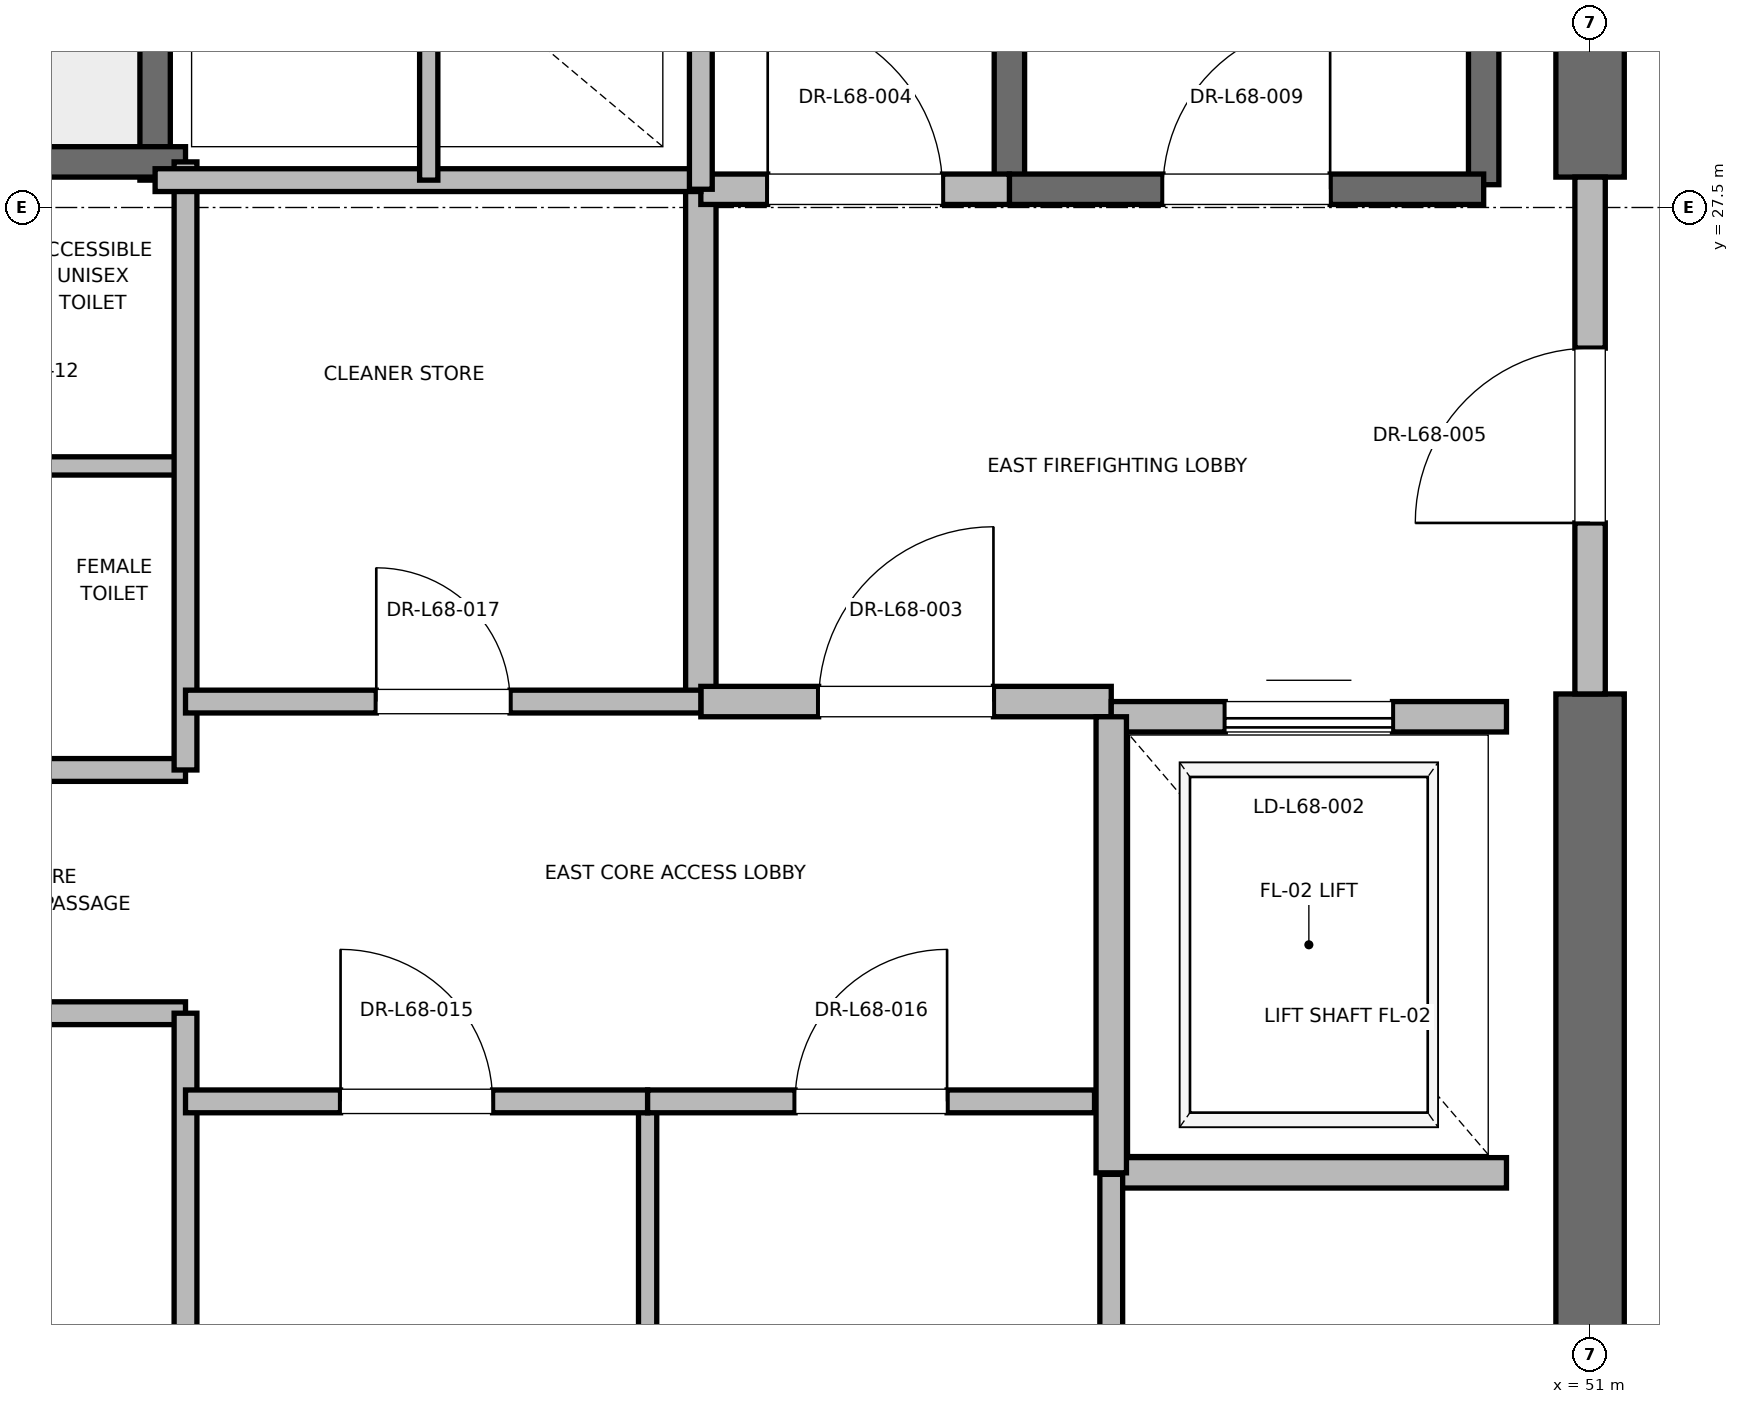
"""IFC4 building model, lengths in metres.
Left out: names, types, materials, properties, quantities, classifications, styles, units other than length and angle.
Written with IfcOpenShell. Run it as: python <this file> out.ifc"""

import sys

from ifc_helpers import new_model, si_unit, direction, frame, frame_2d, origin, place, context, subcontext, project, spatial, rectangle, extrude, element, fill, save


model = new_model("IFC4")
c1 = context("Model", 3, precision=1e-05, world=origin(), true_north=direction((0.0, 1.0)))
c2 = subcontext(c1, "Body", "Model", "MODEL_VIEW")
j1 = project(units=[si_unit("LENGTHUNIT", "METRE"), si_unit("PLANEANGLEUNIT", "RADIAN")], contexts=[c1])
p1 = place(None, origin())
s1 = spatial("IfcSite", under=j1, at=p1, CompositionType="ELEMENT")
p2 = place(p1, origin())
s2 = spatial("IfcBuilding", under=s1, at=p2, CompositionType="ELEMENT")
p3 = place(p2, frame((0.0, 0.0, 291.2)))
s3 = spatial("IfcBuildingStorey", under=s2, at=p3, CompositionType="ELEMENT", Elevation=291.2)
p4 = place(p3, frame((51.0, 18.5, 0.0), z_axis=(0.0, 0.0, 1.0), x_axis=(0.0, 1.0, 0.0)))
e1 = element("IfcWall", 1, at=p4, inside=s3, PredefinedType="SHEAR", context=c2, shape_type="SweptSolid", body=[
    extrude(rectangle(XDim=5.8, YDim=0.45, at=frame_2d((2.9, 0.0))), origin(), (0.0, 0.0, 1.0), 3.7),
])
p5 = place(p3, frame((51.0, 27.7, 0.0), z_axis=(0.0, 0.0, 1.0), x_axis=(0.0, 1.0, 0.0)))
e2 = element("IfcWall", 2, at=p5, inside=s3, PredefinedType="SHEAR", context=c2, shape_type="SweptSolid", body=[
    extrude(rectangle(XDim=8.8, YDim=0.45, at=frame_2d((4.4, 0.0))), origin(), (0.0, 0.0, 1.0), 3.7),
])
p6 = place(p3, frame((50.3, 27.65, 0.0), z_axis=(0.0, 0.0, 1.0), x_axis=(0.0, 1.0, 0.0)))
e3 = element("IfcWall", 3, at=p6, inside=s3, PredefinedType="SOLIDWALL", context=c2, shape_type="SweptSolid", body=[
    extrude(rectangle(XDim=8.15, YDim=0.2, at=frame_2d((4.075, 0.0))), origin(), (0.0, 0.0, 1.0), 3.7),
])
p7 = place(p3, frame((47.18, 27.62, 0.0), z_axis=(0.0, 0.0, 1.0), x_axis=(0.0, 1.0, 0.0)))
e4 = element("IfcWall", 4, at=p7, inside=s3, PredefinedType="SOLIDWALL", context=c2, shape_type="SweptSolid", body=[
    extrude(rectangle(XDim=8.18, YDim=0.2, at=frame_2d((4.09, 0.0))), origin(), (0.0, 0.0, 1.0), 3.7),
])
p8 = place(p3, frame((47.18, 27.62, 0.0), z_axis=(0.0, 0.0, 1.0), x_axis=(1.0, 0.0, 0.0)))
e5 = element("IfcWall", 5, at=p8, inside=s3, PredefinedType="SOLIDWALL", context=c2, shape_type="SweptSolid", body=[
    extrude(rectangle(XDim=3.12, YDim=0.2, at=frame_2d((1.56, 0.0))), origin(), (0.0, 0.0, 1.0), 3.7),
])
p9 = place(p8, frame((1.01, 0.0, 0.0)))
e6 = element("IfcOpeningElement", 6, at=p9, cuts=e5, PredefinedType="OPENING", context=c2, shape_type="SweptSolid", body=[
    extrude(rectangle(XDim=1.1, YDim=2.15, at=frame_2d((0.55, 1.075))), frame((0.0, 0.1, 0.0), z_axis=(0.0, -1.0, 0.0), x_axis=(1.0, 0.0, 0.0)), (0.0, 0.0, 1.0), 0.2),
])
p10 = place(p3, frame((41.56, 27.68, 0.0), z_axis=(0.0, 0.0, 1.0), x_axis=(0.0, 1.0, 0.0)))
e7 = element("IfcWall", 7, at=p10, inside=s3, PredefinedType="SOLIDWALL", context=c2, shape_type="SweptSolid", body=[
    extrude(rectangle(XDim=8.57, YDim=0.2, at=frame_2d((4.285, 0.0))), origin(), (0.0, 0.0, 1.0), 3.7),
])
p11 = place(p3, frame((38.44, 27.8, 0.0), z_axis=(0.0, 0.0, 1.0), x_axis=(1.0, 0.0, 0.0)))
e8 = element("IfcWall", 8, at=p11, inside=s3, PredefinedType="SOLIDWALL", context=c2, shape_type="SweptSolid", body=[
    extrude(rectangle(XDim=3.32, YDim=0.2, at=frame_2d((1.66, 0.0))), origin(), (0.0, 0.0, 1.0), 3.7),
])
p12 = place(p3, frame((45.15, 24.25, 0.0), z_axis=(0.0, 0.0, 1.0), x_axis=(0.0, 1.0, 0.0)))
e9 = element("IfcWall", 9, at=p12, inside=s3, PredefinedType="PARTITIONING", context=c2, shape_type="SweptSolid", body=[
    extrude(rectangle(XDim=3.37, YDim=0.2, at=frame_2d((1.685, 0.0))), origin(), (0.0, 0.0, 1.0), 3.7),
])
p13 = place(p3, frame((45.15, 24.25, 0.0), z_axis=(0.0, 0.0, 1.0), x_axis=(1.0, 0.0, 0.0)))
e10 = element("IfcWall", 10, at=p13, inside=s3, PredefinedType="PARTITIONING", context=c2, shape_type="SweptSolid", body=[
    extrude(rectangle(XDim=2.7, YDim=0.2, at=frame_2d((1.35, 0.0))), origin(), (0.0, 0.0, 1.0), 3.7),
])
p14 = place(p13, frame((0.775, 0.0, 0.0)))
e11 = element("IfcOpeningElement", 11, at=p14, cuts=e10, PredefinedType="OPENING", context=c2, shape_type="SweptSolid", body=[
    extrude(rectangle(XDim=1.15, YDim=2.2, at=frame_2d((0.575, 1.1))), frame((0.0, 0.1, 0.0), z_axis=(0.0, -1.0, 0.0), x_axis=(1.0, 0.0, 0.0)), (0.0, 0.0, 1.0), 0.2),
])
p15 = place(p3, frame((45.15, 27.62, 0.0), z_axis=(0.0, 0.0, 1.0), x_axis=(1.0, 0.0, 0.0)))
e12 = element("IfcWall", 12, at=p15, inside=s3, PredefinedType="PARTITIONING", context=c2, shape_type="SweptSolid", body=[
    extrude(rectangle(XDim=2.03, YDim=0.2, at=frame_2d((1.015, 0.0))), origin(), (0.0, 0.0, 1.0), 3.7),
])
p16 = place(p15, frame((0.44, 0.0, 0.0)))
e13 = element("IfcOpeningElement", 13, at=p16, cuts=e12, PredefinedType="OPENING", context=c2, shape_type="SweptSolid", body=[
    extrude(rectangle(XDim=1.15, YDim=2.2, at=frame_2d((0.575, 1.1))), frame((0.0, 0.1, 0.0), z_axis=(0.0, -1.0, 0.0), x_axis=(1.0, 0.0, 0.0)), (0.0, 0.0, 1.0), 0.2),
])
p17 = place(p3, frame((51.0, 24.3, 0.0), z_axis=(0.0, 0.0, 1.0), x_axis=(0.0, 1.0, 0.0)))
e14 = element("IfcWall", 14, at=p17, inside=s3, PredefinedType="PARTITIONING", context=c2, shape_type="SweptSolid", body=[
    extrude(rectangle(XDim=3.4, YDim=0.2, at=frame_2d((1.7, 0.0))), origin(), (0.0, 0.0, 1.0), 2.78),
])
p18 = place(p17, frame((1.125, 0.0, 0.0)))
e15 = element("IfcOpeningElement", 15, at=p18, cuts=e14, PredefinedType="OPENING", context=c2, shape_type="SweptSolid", body=[
    extrude(rectangle(XDim=1.15, YDim=2.2, at=frame_2d((0.575, 1.1))), frame((0.0, 0.1, 0.0), z_axis=(0.0, -1.0, 0.0), x_axis=(1.0, 0.0, 0.0)), (0.0, 0.0, 1.0), 0.2),
])
p19 = place(p3, frame((47.85, 21.15, 0.0), z_axis=(0.0, 0.0, 1.0), x_axis=(1.0, 0.0, 0.0)))
e16 = element("IfcWall", 16, at=p19, inside=s3, PredefinedType="SOLIDWALL", context=c2, shape_type="SweptSolid", body=[
    extrude(rectangle(XDim=2.6, YDim=0.2, at=frame_2d((1.3, 0.0))), origin(), (0.0, 0.0, 1.0), 3.7),
])
p20 = place(p3, frame((50.45, 24.15, 0.0), z_axis=(0.0, 0.0, 1.0), x_axis=(-1.0, 0.0, 0.0)))
e17 = element("IfcWall", 17, at=p20, inside=s3, PredefinedType="SOLIDWALL", context=c2, shape_type="SweptSolid", body=[
    extrude(rectangle(XDim=2.6, YDim=0.2, at=frame_2d((1.3, 0.0))), origin(), (0.0, 0.0, 1.0), 2.78),
])
p21 = place(p20, frame((0.75, 0.0, 0.0)))
e18 = element("IfcOpeningElement", 18, at=p21, cuts=e17, PredefinedType="OPENING", context=c2, shape_type="SweptSolid", body=[
    extrude(rectangle(XDim=1.1, YDim=2.2, at=frame_2d((0.55, 1.1))), frame((0.0, 0.1, 0.0), z_axis=(0.0, -1.0, 0.0), x_axis=(1.0, 0.0, 0.0)), (0.0, 0.0, 1.0), 0.2),
])
p22 = place(p3, frame((47.85, 24.15, 0.0), z_axis=(0.0, 0.0, 1.0), x_axis=(0.0, -1.0, 0.0)))
e19 = element("IfcWall", 19, at=p22, inside=s3, PredefinedType="SOLIDWALL", context=c2, shape_type="SweptSolid", body=[
    extrude(rectangle(XDim=3.0, YDim=0.2, at=frame_2d((1.5, 0.0))), origin(), (0.0, 0.0, 1.0), 3.7),
])
for number, where, z_axis, x_axis in (
    (20, (39.95, 22.2, 0.0), (0.0, 0.0, 1.0), (1.0, 0.0, 0.0)),
    (21, (39.95, 23.8, 0.0), (0.0, 0.0, 1.0), (1.0, 0.0, 0.0)),
):
    element("IfcWall", number, at=place(p3, frame(where, z_axis=z_axis, x_axis=x_axis)), inside=s3, PredefinedType="PARTITIONING", context=c2, shape_type="SweptSolid", body=[
        extrude(rectangle(XDim=1.81, YDim=0.15, at=frame_2d((0.905, 0.0))), origin(), (0.0, 0.0, 1.0), 2.85),
    ])
p23 = place(p3, frame((39.95, 25.8, 0.0), z_axis=(0.0, 0.0, 1.0), x_axis=(1.0, 0.0, 0.0)))
e22 = element("IfcWall", 22, at=p23, inside=s3, PredefinedType="PARTITIONING", context=c2, shape_type="SweptSolid", body=[
    extrude(rectangle(XDim=1.81, YDim=0.12, at=frame_2d((0.905, 0.0))), origin(), (0.0, 0.0, 1.0), 2.85),
])
p24 = place(p3, frame((41.76, 18.6, 0.0), z_axis=(0.0, 0.0, 1.0), x_axis=(0.0, 1.0, 0.0)))
e23 = element("IfcWall", 23, at=p24, inside=s3, PredefinedType="PARTITIONING", context=c2, shape_type="SweptSolid", body=[
    extrude(rectangle(XDim=3.6, YDim=0.15, at=frame_2d((1.8, 0.0))), origin(), (0.0, 0.0, 1.0), 2.78),
])
p25 = place(p3, frame((41.76, 23.8, 0.0), z_axis=(0.0, 0.0, 1.0), x_axis=(0.0, 1.0, 0.0)))
e24 = element("IfcWall", 24, at=p25, inside=s3, PredefinedType="PARTITIONING", context=c2, shape_type="SweptSolid", body=[
    extrude(rectangle(XDim=4.0, YDim=0.15, at=frame_2d((2.0, 0.0))), origin(), (0.0, 0.0, 1.0), 2.85),
])
p26 = place(p3, frame((41.56, 27.68, 0.0), z_axis=(0.0, 0.0, 1.0), x_axis=(1.0, 0.0, 0.0)))
e25 = element("IfcWall", 25, at=p26, inside=s3, PredefinedType="PARTITIONING", context=c2, shape_type="SweptSolid", body=[
    extrude(rectangle(XDim=3.59, YDim=0.15, at=frame_2d((1.795, 0.0))), origin(), (0.0, 0.0, 1.0), 2.85),
])
p27 = place(p3, frame((47.85, 18.6, 0.0), z_axis=(0.0, 0.0, 1.0), x_axis=(0.0, 1.0, 0.0)))
e26 = element("IfcWall", 26, at=p27, inside=s3, PredefinedType="PARTITIONING", context=c2, shape_type="SweptSolid", body=[
    extrude(rectangle(XDim=2.54, YDim=0.15, at=frame_2d((1.27, 0.0))), origin(), (0.0, 0.0, 1.0), 2.85),
])
p28 = place(p3, frame((44.8, 18.6, 0.0), z_axis=(0.0, 0.0, 1.0), x_axis=(0.0, 1.0, 0.0)))
e27 = element("IfcWall", 27, at=p28, inside=s3, PredefinedType="PARTITIONING", context=c2, shape_type="SweptSolid", body=[
    extrude(rectangle(XDim=3.02, YDim=0.12, at=frame_2d((1.51, 0.0))), origin(), (0.0, 0.0, 1.0), 2.85),
])
p29 = place(p3, frame((41.76, 21.62, 0.0), z_axis=(0.0, 0.0, 1.0), x_axis=(1.0, 0.0, 0.0)))
e28 = element("IfcWall", 28, at=p29, inside=s3, PredefinedType="PARTITIONING", context=c2, shape_type="SweptSolid", body=[
    extrude(rectangle(XDim=3.04, YDim=0.15, at=frame_2d((1.52, 0.0))), origin(), (0.0, 0.0, 1.0), 2.85),
])
p30 = place(p29, frame((1.02, 0.0, 0.0)))
e29 = element("IfcOpeningElement", 29, at=p30, cuts=e28, PredefinedType="OPENING", context=c2, shape_type="SweptSolid", body=[
    extrude(rectangle(XDim=1.0, YDim=2.15, at=frame_2d((0.5, 1.075))), frame((0.0, 0.075, 0.0), z_axis=(0.0, -1.0, 0.0), x_axis=(1.0, 0.0, 0.0)), (0.0, 0.0, 1.0), 0.15),
])
p31 = place(p3, frame((44.8, 21.62, 0.0), z_axis=(0.0, 0.0, 1.0), x_axis=(1.0, 0.0, 0.0)))
e30 = element("IfcWall", 30, at=p31, inside=s3, PredefinedType="PARTITIONING", context=c2, shape_type="SweptSolid", body=[
    extrude(rectangle(XDim=2.94, YDim=0.15, at=frame_2d((1.47, 0.0))), origin(), (0.0, 0.0, 1.0), 2.85),
])
p32 = place(p31, frame((0.97, 0.0, 0.0)))
e31 = element("IfcOpeningElement", 31, at=p32, cuts=e30, PredefinedType="OPENING", context=c2, shape_type="SweptSolid", body=[
    extrude(rectangle(XDim=1.0, YDim=2.15, at=frame_2d((0.5, 1.075))), frame((0.0, 0.075, 0.0), z_axis=(0.0, -1.0, 0.0), x_axis=(1.0, 0.0, 0.0)), (0.0, 0.0, 1.0), 0.15),
])
p33 = place(p3, frame((41.76, 24.25, 0.0), z_axis=(0.0, 0.0, 1.0), x_axis=(1.0, 0.0, 0.0)))
e32 = element("IfcWall", 32, at=p33, inside=s3, PredefinedType="PARTITIONING", context=c2, shape_type="SweptSolid", body=[
    extrude(rectangle(XDim=3.39, YDim=0.15, at=frame_2d((1.695, 0.0))), origin(), (0.0, 0.0, 1.0), 2.85),
])
p34 = place(p33, frame((1.255, 0.0, 0.0)))
e33 = element("IfcOpeningElement", 33, at=p34, cuts=e32, PredefinedType="OPENING", context=c2, shape_type="SweptSolid", body=[
    extrude(rectangle(XDim=0.88, YDim=2.1, at=frame_2d((0.44, 1.05))), frame((0.0, 0.075, 0.0), z_axis=(0.0, -1.0, 0.0), x_axis=(1.0, 0.0, 0.0)), (0.0, 0.0, 1.0), 0.15),
])
p35 = place(p3, frame((45.15, 27.62, 0.0), z_axis=(0.0, 0.0, 1.0), x_axis=(0.0, 1.0, 0.0)))
e34 = element("IfcWall", 34, at=p35, inside=s3, PredefinedType="PARTITIONING", context=c2, shape_type="SweptSolid", body=[
    extrude(rectangle(XDim=3.1, YDim=0.15, at=frame_2d((1.55, 0.0))), origin(), (0.0, 0.0, 1.0), 2.85),
])
p36 = place(p3, frame((43.36, 27.68, 0.0), z_axis=(0.0, 0.0, 1.0), x_axis=(0.0, 1.0, 0.0)))
e35 = element("IfcWall", 35, at=p36, inside=s3, PredefinedType="PARTITIONING", context=c2, shape_type="SweptSolid", body=[
    extrude(rectangle(XDim=3.04, YDim=0.12, at=frame_2d((1.52, 0.0))), origin(), (0.0, 0.0, 1.0), 2.85),
])
p37 = place(p9, origin())
e36 = element("IfcDoor", 36, at=p37, inside=s3, OperationType="SINGLE_SWING_RIGHT", PredefinedType="DOOR", context=c2, shape_type="SweptSolid", body=[
    extrude(rectangle(XDim=1.1, YDim=2.15, at=frame_2d((0.55, 1.075))), frame((0.0, 0.025, 0.0), z_axis=(0.0, -1.0, 0.0), x_axis=(1.0, 0.0, 0.0)), (0.0, 0.0, 1.0), 0.05),
])
fill(e6, e36)
p38 = place(p14, origin())
e37 = element("IfcDoor", 37, at=p38, inside=s3, OperationType="SINGLE_SWING_RIGHT", PredefinedType="DOOR", context=c2, shape_type="SweptSolid", body=[
    extrude(rectangle(XDim=1.15, YDim=2.2, at=frame_2d((0.575, 1.1))), frame((0.0, 0.025, 0.0), z_axis=(0.0, -1.0, 0.0), x_axis=(1.0, 0.0, 0.0)), (0.0, 0.0, 1.0), 0.05),
])
fill(e11, e37)
p39 = place(p16, origin())
e38 = element("IfcDoor", 38, at=p39, inside=s3, OperationType="SINGLE_SWING_LEFT", PredefinedType="DOOR", context=c2, shape_type="SweptSolid", body=[
    extrude(rectangle(XDim=1.15, YDim=2.2, at=frame_2d((0.575, 1.1))), frame((0.0, 0.025, 0.0), z_axis=(0.0, -1.0, 0.0), x_axis=(1.0, 0.0, 0.0)), (0.0, 0.0, 1.0), 0.05),
])
fill(e13, e38)
p40 = place(p18, origin())
e39 = element("IfcDoor", 39, at=p40, inside=s3, OperationType="SINGLE_SWING_LEFT", PredefinedType="DOOR", context=c2, shape_type="SweptSolid", body=[
    extrude(rectangle(XDim=1.15, YDim=2.2, at=frame_2d((0.575, 1.1))), frame((0.0, 0.025, 0.0), z_axis=(0.0, -1.0, 0.0), x_axis=(1.0, 0.0, 0.0)), (0.0, 0.0, 1.0), 0.05),
])
fill(e15, e39)
p41 = place(p21, origin())
e40 = element("IfcDoor", 40, at=p41, inside=s3, OperationType="SLIDING_TO_RIGHT", PredefinedType="DOOR", context=c2, shape_type="SweptSolid", body=[
    extrude(rectangle(XDim=1.1, YDim=2.2, at=frame_2d((0.55, 1.1))), frame((0.0, 0.025, 0.0), z_axis=(0.0, -1.0, 0.0), x_axis=(1.0, 0.0, 0.0)), (0.0, 0.0, 1.0), 0.05),
])
fill(e18, e40)
p42 = place(p30, origin())
e41 = element("IfcDoor", 41, at=p42, inside=s3, OperationType="SINGLE_SWING_LEFT", PredefinedType="DOOR", context=c2, shape_type="SweptSolid", body=[
    extrude(rectangle(XDim=1.0, YDim=2.15, at=frame_2d((0.5, 1.075))), frame((0.0, 0.025, 0.0), z_axis=(0.0, -1.0, 0.0), x_axis=(1.0, 0.0, 0.0)), (0.0, 0.0, 1.0), 0.05),
])
fill(e29, e41)
p43 = place(p32, origin())
e42 = element("IfcDoor", 42, at=p43, inside=s3, OperationType="SINGLE_SWING_RIGHT", PredefinedType="DOOR", context=c2, shape_type="SweptSolid", body=[
    extrude(rectangle(XDim=1.0, YDim=2.15, at=frame_2d((0.5, 1.075))), frame((0.0, 0.025, 0.0), z_axis=(0.0, -1.0, 0.0), x_axis=(1.0, 0.0, 0.0)), (0.0, 0.0, 1.0), 0.05),
])
fill(e31, e42)
p44 = place(p34, origin())
e43 = element("IfcDoor", 43, at=p44, inside=s3, OperationType="SINGLE_SWING_LEFT", PredefinedType="DOOR", context=c2, shape_type="SweptSolid", body=[
    extrude(rectangle(XDim=0.88, YDim=2.1, at=frame_2d((0.44, 1.05))), frame((0.0, 0.025, 0.0), z_axis=(0.0, -1.0, 0.0), x_axis=(1.0, 0.0, 0.0)), (0.0, 0.0, 1.0), 0.05),
])
fill(e33, e43)
save(model, sys.argv[1])
